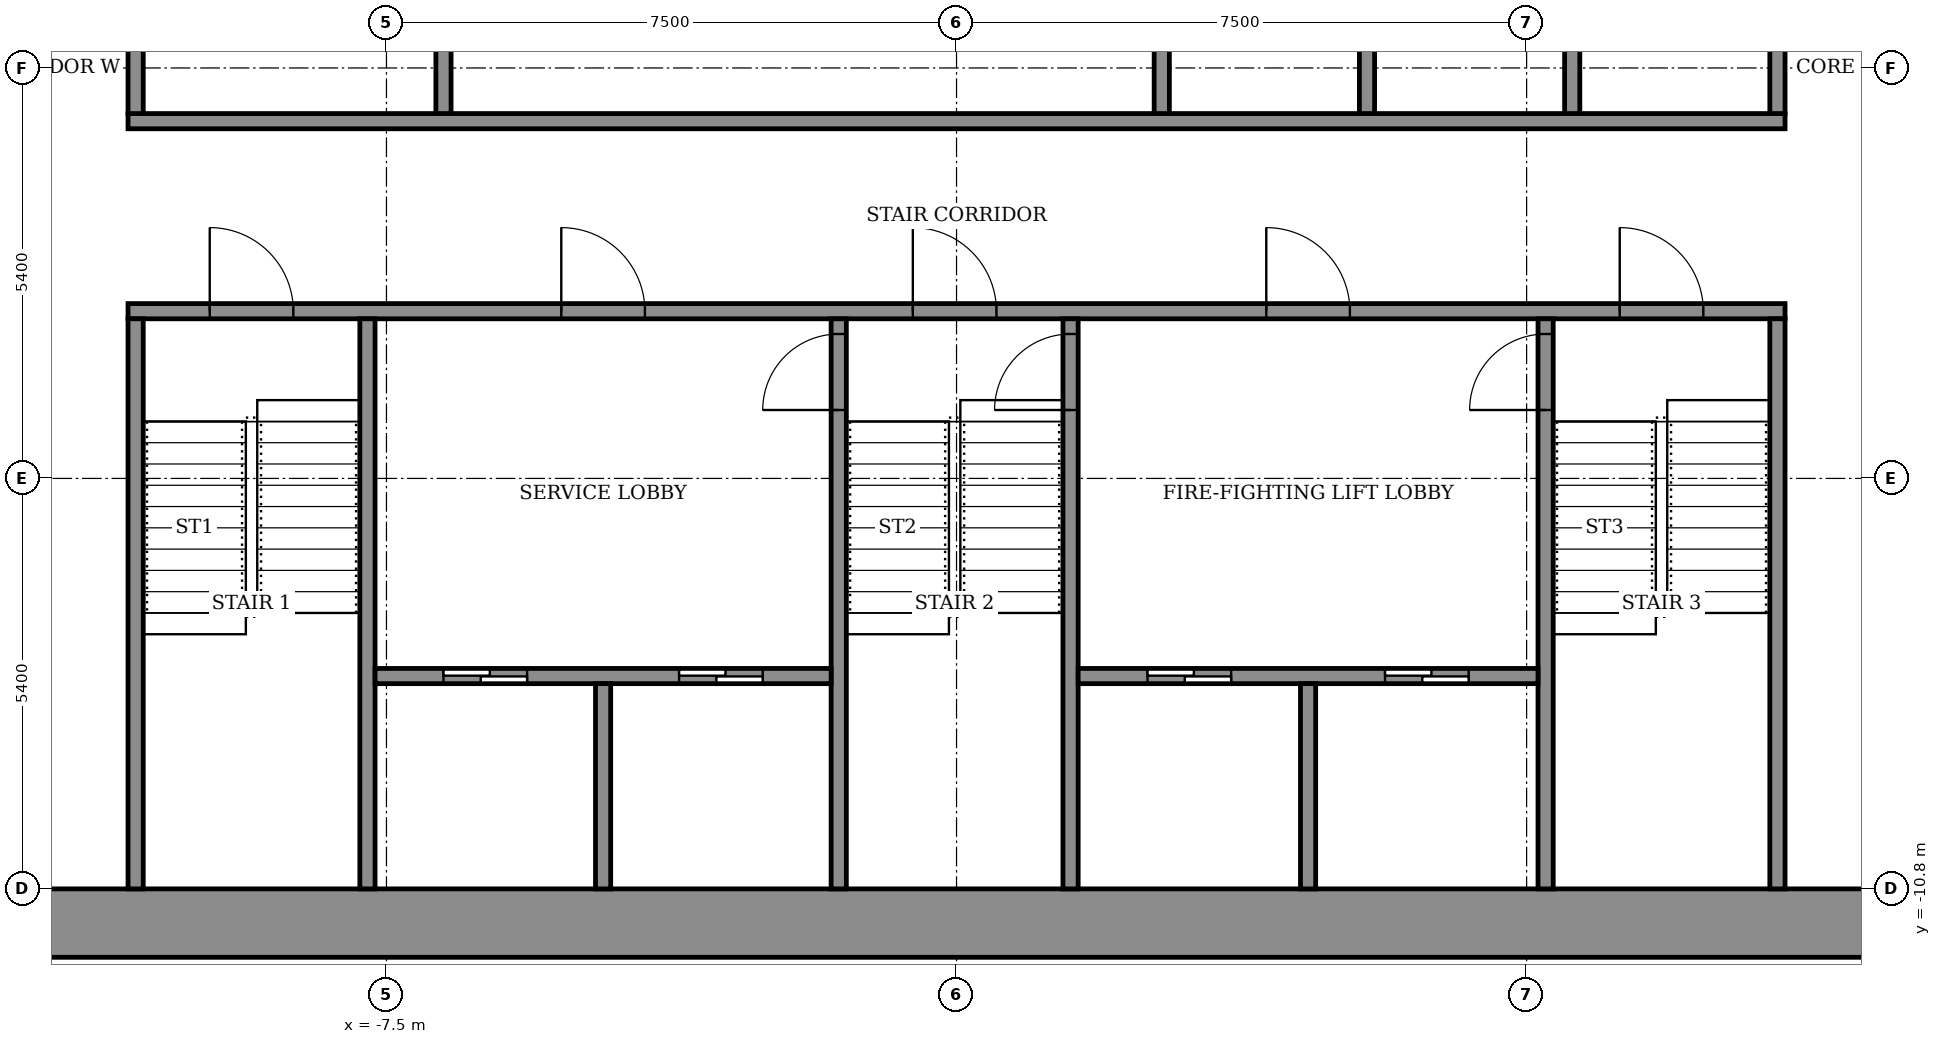
"""IFC4 building model, lengths in metres.
Left out: names, types, materials, properties, quantities, classifications, styles, units other than length and angle.
Written with IfcOpenShell. Run it as: python <this file> out.ifc"""

import sys

from ifc_helpers import new_model, si_unit, direction, frame, frame_2d, origin, place, context, subcontext, project, spatial, rectangle, extrude, element, fill, save


model = new_model("IFC4")
c1 = context("Model", 3, precision=1e-05, world=origin(), true_north=direction((0.0, 1.0)))
c2 = subcontext(c1, "Body", "Model", "MODEL_VIEW")
j1 = project(units=[si_unit("LENGTHUNIT", "METRE"), si_unit("PLANEANGLEUNIT", "RADIAN")], contexts=[c1])
p1 = place(None, origin())
s1 = spatial("IfcSite", under=j1, at=p1, CompositionType="ELEMENT")
p2 = place(p1, origin())
s2 = spatial("IfcBuilding", under=s1, at=p2, CompositionType="ELEMENT")
p3 = place(p2, frame((0.0, 0.0, 144.5)))
s3 = spatial("IfcBuildingStorey", under=s2, at=p3, CompositionType="ELEMENT", Elevation=144.5)
p4 = place(p3, frame((-14.7, -11.25, 0.0), z_axis=(0.0, 0.0, 1.0), x_axis=(1.0, 0.0, 0.0)))
e1 = element("IfcWall", 1, at=p4, inside=s3, PredefinedType="SHEAR", context=c2, shape_type="SweptSolid", body=[
    extrude(rectangle(XDim=29.4, YDim=0.9, at=frame_2d((14.7, 0.0))), origin(), (0.0, 0.0, 1.0), 3.6),
])
p5 = place(p3, frame((-10.9, -3.2, 0.0), z_axis=(0.0, 0.0, 1.0), x_axis=(1.0, 0.0, 0.0)))
e2 = element("IfcWall", 2, at=p5, inside=s3, PredefinedType="SHEAR", context=c2, shape_type="SweptSolid", body=[
    extrude(rectangle(XDim=21.8, YDim=0.2, at=frame_2d((10.9, 0.0))), origin(), (0.0, 0.0, 1.0), 3.05),
])
p6 = place(p5, frame((1.075, 0.0, 0.0)))
e3 = element("IfcOpeningElement", 3, at=p6, cuts=e2, PredefinedType="OPENING", context=c2, shape_type="SweptSolid", body=[
    extrude(rectangle(XDim=1.1, YDim=2.1, at=frame_2d((0.55, 1.05))), frame((0.0, 0.11, 0.0), z_axis=(0.0, -1.0, 0.0), x_axis=(1.0, 0.0, 0.0)), (0.0, 0.0, 1.0), 0.22),
])
p7 = place(p5, frame((10.325, 0.0, 0.0)))
e4 = element("IfcOpeningElement", 4, at=p7, cuts=e2, PredefinedType="OPENING", context=c2, shape_type="SweptSolid", body=[
    extrude(rectangle(XDim=1.1, YDim=2.1, at=frame_2d((0.55, 1.05))), frame((0.0, 0.11, 0.0), z_axis=(0.0, -1.0, 0.0), x_axis=(1.0, 0.0, 0.0)), (0.0, 0.0, 1.0), 0.22),
])
p8 = place(p5, frame((19.625, 0.0, 0.0)))
e5 = element("IfcOpeningElement", 5, at=p8, cuts=e2, PredefinedType="OPENING", context=c2, shape_type="SweptSolid", body=[
    extrude(rectangle(XDim=1.1, YDim=2.1, at=frame_2d((0.55, 1.05))), frame((0.0, 0.11, 0.0), z_axis=(0.0, -1.0, 0.0), x_axis=(1.0, 0.0, 0.0)), (0.0, 0.0, 1.0), 0.22),
])
p9 = place(p5, frame((5.7, 0.0, 0.0)))
e6 = element("IfcOpeningElement", 6, at=p9, cuts=e2, PredefinedType="OPENING", context=c2, shape_type="SweptSolid", body=[
    extrude(rectangle(XDim=1.1, YDim=2.1, at=frame_2d((0.55, 1.05))), frame((0.0, 0.11, 0.0), z_axis=(0.0, -1.0, 0.0), x_axis=(1.0, 0.0, 0.0)), (0.0, 0.0, 1.0), 0.22),
])
p10 = place(p5, frame((14.975, 0.0, 0.0)))
e7 = element("IfcOpeningElement", 7, at=p10, cuts=e2, PredefinedType="OPENING", context=c2, shape_type="SweptSolid", body=[
    extrude(rectangle(XDim=1.1, YDim=2.1, at=frame_2d((0.55, 1.05))), frame((0.0, 0.11, 0.0), z_axis=(0.0, -1.0, 0.0), x_axis=(1.0, 0.0, 0.0)), (0.0, 0.0, 1.0), 0.22),
])
p11 = place(p3, frame((-10.9, -0.7, 0.0), z_axis=(0.0, 0.0, 1.0), x_axis=(1.0, 0.0, 0.0)))
e8 = element("IfcWall", 8, at=p11, inside=s3, PredefinedType="SHEAR", context=c2, shape_type="SweptSolid", body=[
    extrude(rectangle(XDim=21.8, YDim=0.2, at=frame_2d((10.9, 0.0))), origin(), (0.0, 0.0, 1.0), 3.05),
])
for number, where, z_axis, x_axis in (
    (9, (-10.8, -10.8, 0.0), (0.0, 0.0, 1.0), (0.0, 1.0, 0.0)),
    (10, (-7.75, -10.8, 0.0), (0.0, 0.0, 1.0), (0.0, 1.0, 0.0)),
):
    element("IfcWall", number, at=place(p3, frame(where, z_axis=z_axis, x_axis=x_axis)), inside=s3, PredefinedType="SHEAR", context=c2, shape_type="SweptSolid", body=[
        extrude(rectangle(XDim=7.5, YDim=0.2, at=frame_2d((3.75, 0.0))), origin(), (0.0, 0.0, 1.0), 3.05),
    ])
p12 = place(p3, frame((-1.55, -10.8, 0.0), z_axis=(0.0, 0.0, 1.0), x_axis=(0.0, 1.0, 0.0)))
e11 = element("IfcWall", 11, at=p12, inside=s3, PredefinedType="SHEAR", context=c2, shape_type="SweptSolid", body=[
    extrude(rectangle(XDim=7.5, YDim=0.2, at=frame_2d((3.75, 0.0))), origin(), (0.0, 0.0, 1.0), 3.05),
])
p13 = place(p12, frame((6.3, 0.0, 0.0)))
e12 = element("IfcOpeningElement", 12, at=p13, cuts=e11, PredefinedType="OPENING", context=c2, shape_type="SweptSolid", body=[
    extrude(rectangle(XDim=1.0, YDim=2.1, at=frame_2d((0.5, 1.05))), frame((0.0, 0.11, 0.0), z_axis=(0.0, -1.0, 0.0), x_axis=(1.0, 0.0, 0.0)), (0.0, 0.0, 1.0), 0.22),
])
p14 = place(p3, frame((1.5, -10.8, 0.0), z_axis=(0.0, 0.0, 1.0), x_axis=(0.0, 1.0, 0.0)))
e13 = element("IfcWall", 13, at=p14, inside=s3, PredefinedType="SHEAR", context=c2, shape_type="SweptSolid", body=[
    extrude(rectangle(XDim=7.5, YDim=0.2, at=frame_2d((3.75, 0.0))), origin(), (0.0, 0.0, 1.0), 3.05),
])
p15 = place(p14, frame((6.3, 0.0, 0.0)))
e14 = element("IfcOpeningElement", 14, at=p15, cuts=e13, PredefinedType="OPENING", context=c2, shape_type="SweptSolid", body=[
    extrude(rectangle(XDim=1.0, YDim=2.1, at=frame_2d((0.5, 1.05))), frame((0.0, 0.11, 0.0), z_axis=(0.0, -1.0, 0.0), x_axis=(1.0, 0.0, 0.0)), (0.0, 0.0, 1.0), 0.22),
])
p16 = place(p3, frame((7.75, -10.8, 0.0), z_axis=(0.0, 0.0, 1.0), x_axis=(0.0, 1.0, 0.0)))
e15 = element("IfcWall", 15, at=p16, inside=s3, PredefinedType="SHEAR", context=c2, shape_type="SweptSolid", body=[
    extrude(rectangle(XDim=7.5, YDim=0.2, at=frame_2d((3.75, 0.0))), origin(), (0.0, 0.0, 1.0), 3.05),
])
p17 = place(p16, frame((6.3, 0.0, 0.0)))
e16 = element("IfcOpeningElement", 16, at=p17, cuts=e15, PredefinedType="OPENING", context=c2, shape_type="SweptSolid", body=[
    extrude(rectangle(XDim=1.0, YDim=2.1, at=frame_2d((0.5, 1.05))), frame((0.0, 0.11, 0.0), z_axis=(0.0, -1.0, 0.0), x_axis=(1.0, 0.0, 0.0)), (0.0, 0.0, 1.0), 0.22),
])
p18 = place(p3, frame((10.8, -10.8, 0.0), z_axis=(0.0, 0.0, 1.0), x_axis=(0.0, 1.0, 0.0)))
e17 = element("IfcWall", 17, at=p18, inside=s3, PredefinedType="SHEAR", context=c2, shape_type="SweptSolid", body=[
    extrude(rectangle(XDim=7.5, YDim=0.2, at=frame_2d((3.75, 0.0))), origin(), (0.0, 0.0, 1.0), 3.05),
])
p19 = place(p3, frame((-7.65, -8.0, 0.0), z_axis=(0.0, 0.0, 1.0), x_axis=(1.0, 0.0, 0.0)))
e18 = element("IfcWall", 18, at=p19, inside=s3, PredefinedType="SHEAR", context=c2, shape_type="SweptSolid", body=[
    extrude(rectangle(XDim=6.0, YDim=0.2, at=frame_2d((3.0, 0.0))), origin(), (0.0, 0.0, 1.0), 3.05),
])
p20 = place(p19, frame((0.9, 0.0, 0.0)))
e19 = element("IfcOpeningElement", 19, at=p20, cuts=e18, PredefinedType="OPENING", context=c2, shape_type="SweptSolid", body=[
    extrude(rectangle(XDim=1.1, YDim=2.1, at=frame_2d((0.55, 1.05))), frame((0.0, 0.11, 0.0), z_axis=(0.0, -1.0, 0.0), x_axis=(1.0, 0.0, 0.0)), (0.0, 0.0, 1.0), 0.22),
])
p21 = place(p19, frame((4.0, 0.0, 0.0)))
e20 = element("IfcOpeningElement", 20, at=p21, cuts=e18, PredefinedType="OPENING", context=c2, shape_type="SweptSolid", body=[
    extrude(rectangle(XDim=1.1, YDim=2.1, at=frame_2d((0.55, 1.05))), frame((0.0, 0.11, 0.0), z_axis=(0.0, -1.0, 0.0), x_axis=(1.0, 0.0, 0.0)), (0.0, 0.0, 1.0), 0.22),
])
p22 = place(p3, frame((-4.65, -10.8, 0.0), z_axis=(0.0, 0.0, 1.0), x_axis=(0.0, 1.0, 0.0)))
e21 = element("IfcWall", 21, at=p22, inside=s3, PredefinedType="SHEAR", context=c2, shape_type="SweptSolid", body=[
    extrude(rectangle(XDim=2.7, YDim=0.2, at=frame_2d((1.35, 0.0))), origin(), (0.0, 0.0, 1.0), 3.05),
])
p23 = place(p3, frame((1.6, -8.0, 0.0), z_axis=(0.0, 0.0, 1.0), x_axis=(1.0, 0.0, 0.0)))
e22 = element("IfcWall", 22, at=p23, inside=s3, PredefinedType="SHEAR", context=c2, shape_type="SweptSolid", body=[
    extrude(rectangle(XDim=6.05, YDim=0.2, at=frame_2d((3.025, 0.0))), origin(), (0.0, 0.0, 1.0), 3.05),
])
p24 = place(p23, frame((0.913, 0.0, 0.0)))
e23 = element("IfcOpeningElement", 23, at=p24, cuts=e22, PredefinedType="OPENING", context=c2, shape_type="SweptSolid", body=[
    extrude(rectangle(XDim=1.1, YDim=2.1, at=frame_2d((0.55, 1.05))), frame((0.0, 0.11, 0.0), z_axis=(0.0, -1.0, 0.0), x_axis=(1.0, 0.0, 0.0)), (0.0, 0.0, 1.0), 0.22),
])
p25 = place(p23, frame((4.038, 0.0, 0.0)))
e24 = element("IfcOpeningElement", 24, at=p25, cuts=e22, PredefinedType="OPENING", context=c2, shape_type="SweptSolid", body=[
    extrude(rectangle(XDim=1.1, YDim=2.1, at=frame_2d((0.55, 1.05))), frame((0.0, 0.11, 0.0), z_axis=(0.0, -1.0, 0.0), x_axis=(1.0, 0.0, 0.0)), (0.0, 0.0, 1.0), 0.22),
])
p26 = place(p3, frame((4.625, -10.8, 0.0), z_axis=(0.0, 0.0, 1.0), x_axis=(0.0, 1.0, 0.0)))
e25 = element("IfcWall", 25, at=p26, inside=s3, PredefinedType="SHEAR", context=c2, shape_type="SweptSolid", body=[
    extrude(rectangle(XDim=2.7, YDim=0.2, at=frame_2d((1.35, 0.0))), origin(), (0.0, 0.0, 1.0), 3.05),
])
for number, where, z_axis, x_axis in (
    (26, (-10.8, -0.6, 0.0), (0.0, 0.0, 1.0), (0.0, 1.0, 0.0)),
    (27, (-6.75, -0.6, 0.0), (0.0, 0.0, 1.0), (0.0, 1.0, 0.0)),
):
    element("IfcWall", number, at=place(p3, frame(where, z_axis=z_axis, x_axis=x_axis)), inside=s3, PredefinedType="STANDARD", context=c2, shape_type="SweptSolid", body=[
        extrude(rectangle(XDim=2.5, YDim=0.2, at=frame_2d((1.25, 0.0))), origin(), (0.0, 0.0, 1.0), 3.05),
    ])
for number, where, z_axis, x_axis in (
    (28, (2.7, -0.6, 0.0), (0.0, 0.0, 1.0), (0.0, 1.0, 0.0)),
    (29, (5.4, -0.6, 0.0), (0.0, 0.0, 1.0), (0.0, 1.0, 0.0)),
    (30, (8.1, -0.6, 0.0), (0.0, 0.0, 1.0), (0.0, 1.0, 0.0)),
    (31, (10.8, -0.6, 0.0), (0.0, 0.0, 1.0), (0.0, 1.0, 0.0)),
):
    element("IfcWall", number, at=place(p3, frame(where, z_axis=z_axis, x_axis=x_axis)), inside=s3, PredefinedType="SHEAR", context=c2, shape_type="SweptSolid", body=[
        extrude(rectangle(XDim=2.5, YDim=0.2, at=frame_2d((1.25, 0.0))), origin(), (0.0, 0.0, 1.0), 3.05),
    ])
p27 = place(p24, origin())
e32 = element("IfcDoor", 32, at=p27, inside=s3, OperationType="SLIDING_TO_LEFT", PredefinedType="DOOR", context=c2, shape_type="SweptSolid", body=[
    extrude(rectangle(XDim=1.1, YDim=2.1, at=frame_2d((0.55, 1.05))), frame((0.0, 0.025, 0.0), z_axis=(0.0, -1.0, 0.0), x_axis=(1.0, 0.0, 0.0)), (0.0, 0.0, 1.0), 0.05),
])
fill(e23, e32)
p28 = place(p20, origin())
e33 = element("IfcDoor", 33, at=p28, inside=s3, OperationType="SLIDING_TO_LEFT", PredefinedType="DOOR", context=c2, shape_type="SweptSolid", body=[
    extrude(rectangle(XDim=1.1, YDim=2.1, at=frame_2d((0.55, 1.05))), frame((0.0, 0.025, 0.0), z_axis=(0.0, -1.0, 0.0), x_axis=(1.0, 0.0, 0.0)), (0.0, 0.0, 1.0), 0.05),
])
fill(e19, e33)
p29 = place(p25, origin())
e34 = element("IfcDoor", 34, at=p29, inside=s3, OperationType="SLIDING_TO_LEFT", PredefinedType="DOOR", context=c2, shape_type="SweptSolid", body=[
    extrude(rectangle(XDim=1.1, YDim=2.1, at=frame_2d((0.55, 1.05))), frame((0.0, 0.025, 0.0), z_axis=(0.0, -1.0, 0.0), x_axis=(1.0, 0.0, 0.0)), (0.0, 0.0, 1.0), 0.05),
])
fill(e24, e34)
p30 = place(p21, origin())
e35 = element("IfcDoor", 35, at=p30, inside=s3, OperationType="SLIDING_TO_LEFT", PredefinedType="DOOR", context=c2, shape_type="SweptSolid", body=[
    extrude(rectangle(XDim=1.1, YDim=2.1, at=frame_2d((0.55, 1.05))), frame((0.0, 0.025, 0.0), z_axis=(0.0, -1.0, 0.0), x_axis=(1.0, 0.0, 0.0)), (0.0, 0.0, 1.0), 0.05),
])
fill(e20, e35)
p31 = place(p6, origin())
e36 = element("IfcDoor", 36, at=p31, inside=s3, OperationType="SINGLE_SWING_RIGHT", PredefinedType="DOOR", context=c2, shape_type="SweptSolid", body=[
    extrude(rectangle(XDim=1.1, YDim=2.1, at=frame_2d((0.55, 1.05))), frame((0.0, 0.025, 0.0), z_axis=(0.0, -1.0, 0.0), x_axis=(1.0, 0.0, 0.0)), (0.0, 0.0, 1.0), 0.05),
])
fill(e3, e36)
p32 = place(p7, origin())
e37 = element("IfcDoor", 37, at=p32, inside=s3, OperationType="SINGLE_SWING_RIGHT", PredefinedType="DOOR", context=c2, shape_type="SweptSolid", body=[
    extrude(rectangle(XDim=1.1, YDim=2.1, at=frame_2d((0.55, 1.05))), frame((0.0, 0.025, 0.0), z_axis=(0.0, -1.0, 0.0), x_axis=(1.0, 0.0, 0.0)), (0.0, 0.0, 1.0), 0.05),
])
fill(e4, e37)
p33 = place(p8, origin())
e38 = element("IfcDoor", 38, at=p33, inside=s3, OperationType="SINGLE_SWING_RIGHT", PredefinedType="DOOR", context=c2, shape_type="SweptSolid", body=[
    extrude(rectangle(XDim=1.1, YDim=2.1, at=frame_2d((0.55, 1.05))), frame((0.0, 0.025, 0.0), z_axis=(0.0, -1.0, 0.0), x_axis=(1.0, 0.0, 0.0)), (0.0, 0.0, 1.0), 0.05),
])
fill(e5, e38)
p34 = place(p9, origin())
e39 = element("IfcDoor", 39, at=p34, inside=s3, OperationType="SINGLE_SWING_LEFT", PredefinedType="DOOR", context=c2, shape_type="SweptSolid", body=[
    extrude(rectangle(XDim=1.1, YDim=2.1, at=frame_2d((0.55, 1.05))), frame((0.0, 0.025, 0.0), z_axis=(0.0, -1.0, 0.0), x_axis=(1.0, 0.0, 0.0)), (0.0, 0.0, 1.0), 0.05),
])
fill(e6, e39)
p35 = place(p10, origin())
e40 = element("IfcDoor", 40, at=p35, inside=s3, OperationType="SINGLE_SWING_LEFT", PredefinedType="DOOR", context=c2, shape_type="SweptSolid", body=[
    extrude(rectangle(XDim=1.1, YDim=2.1, at=frame_2d((0.55, 1.05))), frame((0.0, 0.025, 0.0), z_axis=(0.0, -1.0, 0.0), x_axis=(1.0, 0.0, 0.0)), (0.0, 0.0, 1.0), 0.05),
])
fill(e7, e40)
p36 = place(p13, origin())
e41 = element("IfcDoor", 41, at=p36, inside=s3, OperationType="SINGLE_SWING_RIGHT", PredefinedType="DOOR", context=c2, shape_type="SweptSolid", body=[
    extrude(rectangle(XDim=1.0, YDim=2.1, at=frame_2d((0.5, 1.05))), frame((0.0, 0.025, 0.0), z_axis=(0.0, -1.0, 0.0), x_axis=(1.0, 0.0, 0.0)), (0.0, 0.0, 1.0), 0.05),
])
fill(e12, e41)
p37 = place(p15, origin())
e42 = element("IfcDoor", 42, at=p37, inside=s3, OperationType="SINGLE_SWING_RIGHT", PredefinedType="DOOR", context=c2, shape_type="SweptSolid", body=[
    extrude(rectangle(XDim=1.0, YDim=2.1, at=frame_2d((0.5, 1.05))), frame((0.0, 0.025, 0.0), z_axis=(0.0, -1.0, 0.0), x_axis=(1.0, 0.0, 0.0)), (0.0, 0.0, 1.0), 0.05),
])
fill(e14, e42)
p38 = place(p17, origin())
e43 = element("IfcDoor", 43, at=p38, inside=s3, OperationType="SINGLE_SWING_RIGHT", PredefinedType="DOOR", context=c2, shape_type="SweptSolid", body=[
    extrude(rectangle(XDim=1.0, YDim=2.1, at=frame_2d((0.5, 1.05))), frame((0.0, 0.025, 0.0), z_axis=(0.0, -1.0, 0.0), x_axis=(1.0, 0.0, 0.0)), (0.0, 0.0, 1.0), 0.05),
])
fill(e16, e43)
save(model, sys.argv[1])
